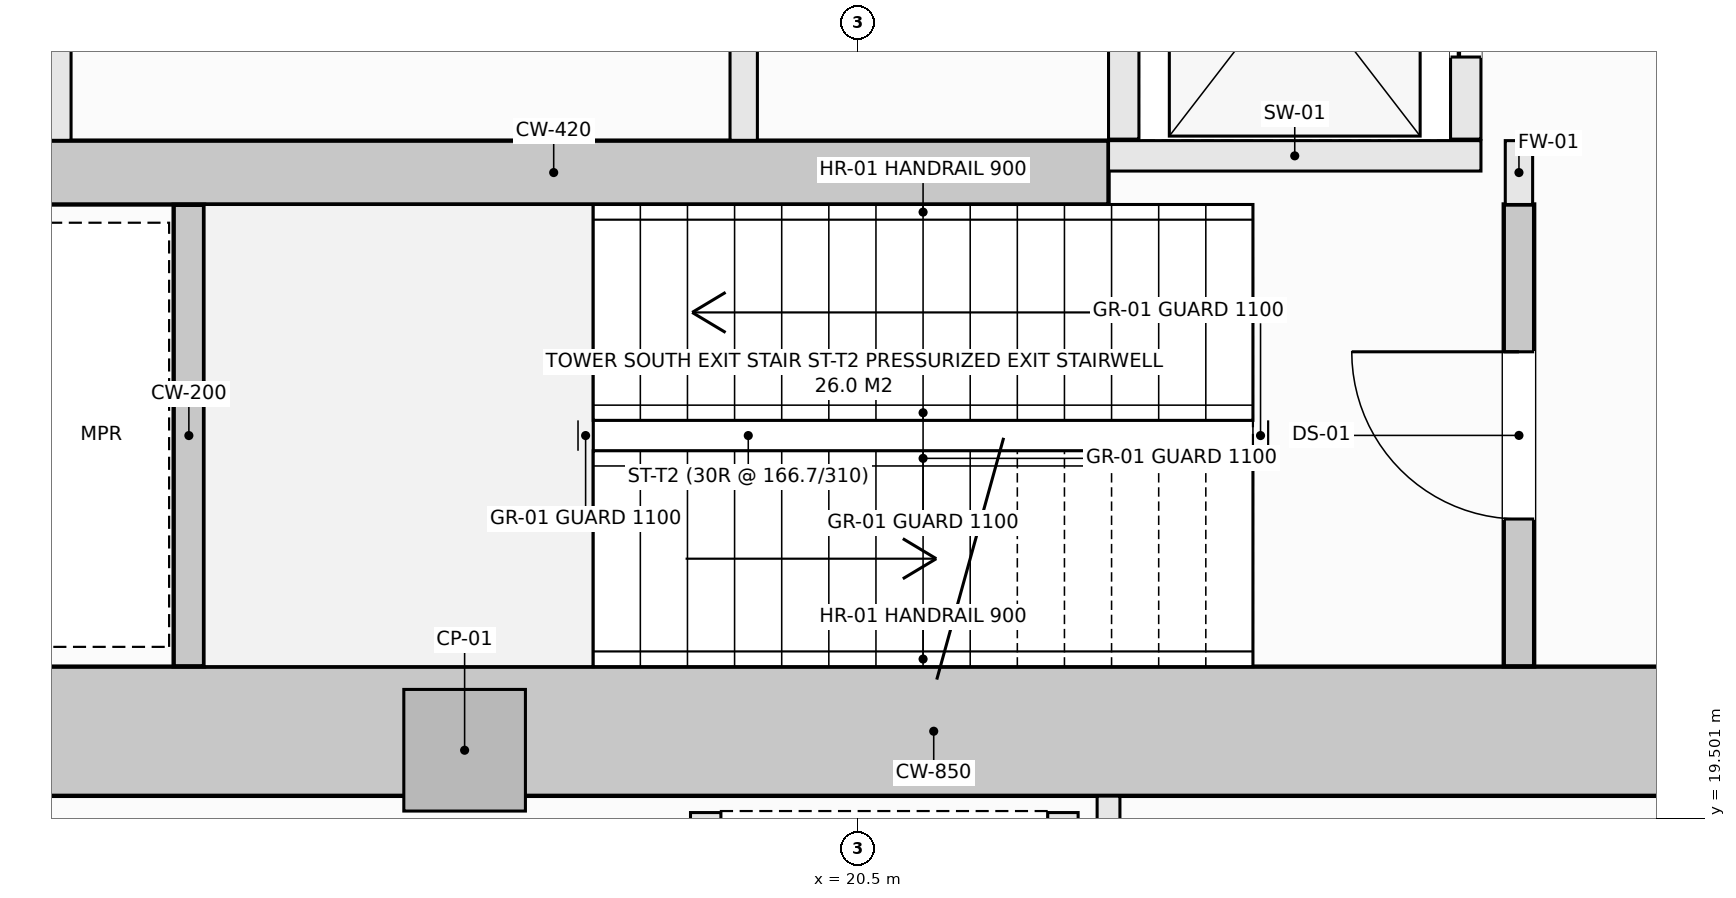
"""IFC4 building model, lengths in metres.
Left out: names, types, materials, properties, quantities, classifications, styles, units other than length and angle.
Written with IfcOpenShell. Run it as: python <this file> out.ifc"""

import sys

from ifc_helpers import new_model, si_unit, direction, frame, frame_2d, origin, origin_2d, place, context, subcontext, project, spatial, rectangle, extrude, element, fill, save


model = new_model("IFC4")
c1 = context("Model", 3, precision=1e-05, world=origin(), true_north=direction((0.0, 1.0)))
c2 = subcontext(c1, "Body", "Model", "MODEL_VIEW")
j1 = project(units=[si_unit("LENGTHUNIT", "METRE"), si_unit("PLANEANGLEUNIT", "RADIAN")], contexts=[c1])
p1 = place(None, origin())
s1 = spatial("IfcSite", under=j1, at=p1, CompositionType="ELEMENT")
p2 = place(p1, origin())
s2 = spatial("IfcBuilding", under=s1, at=p2, CompositionType="ELEMENT")
p3 = place(p2, origin())
s3 = spatial("IfcBuildingStorey", under=s2, at=p3, CompositionType="ELEMENT", Elevation=0.0)
p4 = place(p3, frame((14.075, 20.075, -0.36), z_axis=(0.0, 0.0, 1.0), x_axis=(1.0, 0.0, 0.0)))
e1 = element("IfcWall", 1, at=p4, inside=s3, PredefinedType="SHEAR", context=c2, shape_type="SweptSolid", body=[
    extrude(rectangle(XDim=13.85, YDim=0.85, at=frame_2d((6.925, 0.0))), origin(), (0.0, 0.0, 1.0), 5.1),
])
p5 = place(p3, frame((14.85, 23.75, -0.36), z_axis=(0.0, 0.0, 1.0), x_axis=(1.0, 0.0, 0.0)))
e2 = element("IfcWall", 2, at=p5, inside=s3, PredefinedType="SHEAR", context=c2, shape_type="SweptSolid", body=[
    extrude(rectangle(XDim=7.3, YDim=0.42, at=frame_2d((3.65, 0.0))), origin(), (0.0, 0.0, 1.0), 5.1),
])
p6 = place(p3, frame((17.914, 19.95, -0.36), z_axis=(0.0, 0.0, 1.0), x_axis=(1.0, 0.0, 0.0)))
e3 = element("IfcColumn", 3, at=p6, inside=s3, PredefinedType="PILASTER", context=c2, shape_type="SweptSolid", body=[
    extrude(rectangle(XDim=0.8, YDim=0.8, at=origin_2d()), origin(), (0.0, 0.0, 1.0), 5.1),
])
p7 = place(p3, frame((24.85, 20.502, -0.36), z_axis=(0.0, 0.0, 1.0), x_axis=(0.0, 1.0, 0.0)))
e4 = element("IfcWall", 4, at=p7, inside=s3, PredefinedType="SHEAR", context=c2, shape_type="SweptSolid", body=[
    extrude(rectangle(XDim=3.038, YDim=0.2, at=frame_2d((1.519, 0.0))), origin(), (0.0, 0.0, 1.0), 5.1),
])
p8 = place(p7, frame((0.969, 0.0, 0.36)))
e5 = element("IfcOpeningElement", 5, at=p8, cuts=e4, PredefinedType="OPENING", context=c2, shape_type="SweptSolid", body=[
    extrude(rectangle(XDim=1.1, YDim=2.15, at=frame_2d((0.55, 1.075))), frame((0.0, 0.11, 0.0), z_axis=(0.0, -1.0, 0.0), x_axis=(1.0, 0.0, 0.0)), (0.0, 0.0, 1.0), 0.22),
])
p9 = place(p3, frame((16.1, 20.502, -0.36), z_axis=(0.0, 0.0, 1.0), x_axis=(0.0, 1.0, 0.0)))
e6 = element("IfcWall", 6, at=p9, inside=s3, PredefinedType="SHEAR", context=c2, shape_type="SweptSolid", body=[
    extrude(rectangle(XDim=3.036, YDim=0.2, at=frame_2d((1.518, 0.0))), origin(), (0.0, 0.0, 1.0), 5.1),
])
p10 = place(p3, frame((22.15, 23.86, 0.0), z_axis=(0.0, 0.0, 1.0), x_axis=(1.0, 0.0, 0.0)))
e7 = element("IfcWall", 7, at=p10, inside=s3, PredefinedType="SOLIDWALL", context=c2, shape_type="SweptSolid", body=[
    extrude(rectangle(XDim=2.45, YDim=0.2, at=frame_2d((1.225, 0.0))), origin(), (0.0, 0.0, 1.0), 4.74),
])
p11 = place(p3, frame((22.25, 23.97, 0.0), z_axis=(0.0, 0.0, 1.0), x_axis=(0.0, 1.0, 0.0)))
e8 = element("IfcWall", 8, at=p11, inside=s3, PredefinedType="SOLIDWALL", context=c2, shape_type="SweptSolid", body=[
    extrude(rectangle(XDim=2.18, YDim=0.2, at=frame_2d((1.09, 0.0))), origin(), (0.0, 0.0, 1.0), 4.74),
])
p12 = place(p3, frame((24.5, 23.97, 0.0), z_axis=(0.0, 0.0, 1.0), x_axis=(0.0, 1.0, 0.0)))
e9 = element("IfcWall", 9, at=p12, inside=s3, PredefinedType="SOLIDWALL", context=c2, shape_type="SweptSolid", body=[
    extrude(rectangle(XDim=2.18, YDim=0.2, at=frame_2d((1.09, 0.0))), origin(), (0.0, 0.0, 1.0), 4.74),
])
p13 = place(p12, frame((0.54, 0.0, 0.0)))
e10 = element("IfcOpeningElement", 10, at=p13, cuts=e9, PredefinedType="OPENING", context=c2, shape_type="SweptSolid", body=[
    extrude(rectangle(XDim=1.1, YDim=2.2, at=frame_2d((0.55, 1.1))), frame((0.0, 0.11, 0.0), z_axis=(0.0, -1.0, 0.0), x_axis=(1.0, 0.0, 0.0)), (0.0, 0.0, 1.0), 0.22),
])
for number, where, z_axis, x_axis in (
    (11, (19.5, 17.01, 0.0), (0.0, 0.0, 1.0), (0.0, 1.0, 0.0)),
    (12, (21.85, 17.01, 0.0), (0.0, 0.0, 1.0), (0.0, 1.0, 0.0)),
):
    element("IfcWall", number, at=place(p3, frame(where, z_axis=z_axis, x_axis=x_axis)), inside=s3, PredefinedType="SOLIDWALL", context=c2, shape_type="SweptSolid", body=[
        extrude(rectangle(XDim=2.53, YDim=0.2, at=frame_2d((1.265, 0.0))), origin(), (0.0, 0.0, 1.0), 4.74),
    ])
p14 = place(p3, frame((24.85, 23.54, 0.0), z_axis=(0.0, 0.0, 1.0), x_axis=(0.0, 1.0, 0.0)))
e13 = element("IfcWall", 13, at=p14, inside=s3, PredefinedType="SOLIDWALL", context=c2, shape_type="SweptSolid", body=[
    extrude(rectangle(XDim=0.42, YDim=0.18, at=frame_2d((0.21, 0.0))), origin(), (0.0, 0.0, 1.0), 4.74),
])
p15 = place(p3, frame((15.25, 23.962, 0.0), z_axis=(0.0, 0.0, 1.0), x_axis=(0.0, 1.0, 0.0)))
e14 = element("IfcWall", 14, at=p15, inside=s3, PredefinedType="PARTITIONING", context=c2, shape_type="SweptSolid", body=[
    extrude(rectangle(XDim=2.106, YDim=0.15, at=frame_2d((1.053, 0.0))), origin(), (0.0, 0.0, 1.0), 4.74),
])
p16 = place(p3, frame((19.75, 23.962, 0.0), z_axis=(0.0, 0.0, 1.0), x_axis=(0.0, 1.0, 0.0)))
e15 = element("IfcWall", 15, at=p16, inside=s3, PredefinedType="SOLIDWALL", context=c2, shape_type="SweptSolid", body=[
    extrude(rectangle(XDim=2.106, YDim=0.18, at=frame_2d((1.053, 0.0))), origin(), (0.0, 0.0, 1.0), 4.74),
])
p17 = place(p3, frame((22.15, 17.127, 0.0), z_axis=(0.0, 0.0, 1.0), x_axis=(0.0, 1.0, 0.0)))
e16 = element("IfcWall", 16, at=p17, inside=s3, PredefinedType="PARTITIONING", context=c2, shape_type="SweptSolid", body=[
    extrude(rectangle(XDim=2.521, YDim=0.15, at=frame_2d((1.26, 0.0))), origin(), (0.0, 0.0, 1.0), 4.74),
])
p18 = place(p8, origin())
e17 = element("IfcDoor", 17, at=p18, inside=s3, OperationType="SINGLE_SWING_RIGHT", PredefinedType="DOOR", context=c2, shape_type="SweptSolid", body=[
    extrude(rectangle(XDim=1.1, YDim=2.15, at=frame_2d((0.55, 1.075))), frame((0.0, 0.025, 0.0), z_axis=(0.0, -1.0, 0.0), x_axis=(1.0, 0.0, 0.0)), (0.0, 0.0, 1.0), 0.05),
])
fill(e5, e17)
p19 = place(p13, origin())
e18 = element("IfcDoor", 18, at=p19, inside=s3, OperationType="SLIDING_TO_LEFT", PredefinedType="DOOR", context=c2, shape_type="SweptSolid", body=[
    extrude(rectangle(XDim=1.1, YDim=2.2, at=frame_2d((0.55, 1.1))), frame((0.0, 0.025, 0.0), z_axis=(0.0, -1.0, 0.0), x_axis=(1.0, 0.0, 0.0)), (0.0, 0.0, 1.0), 0.05),
])
fill(e10, e18)
save(model, sys.argv[1])
